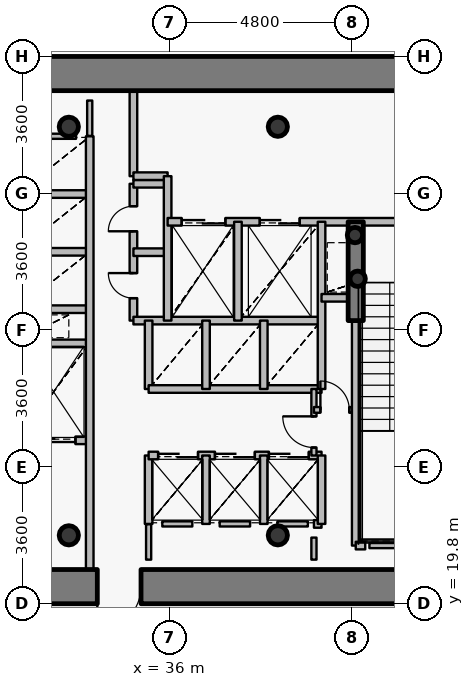
"""IFC4 building model, lengths in metres.
Left out: names, types, materials, properties, quantities, classifications, styles, units other than length and angle.
Written with IfcOpenShell. Run it as: python <this file> out.ifc"""

import sys

from ifc_helpers import new_model, si_unit, direction, frame, frame_2d, origin, origin_2d, place, context, subcontext, project, spatial, rectangle, hollow_circle, extrude, source, transform, mapped, element, fill, save


model = new_model("IFC4")
c1 = context("Model", 3, precision=1e-05, world=origin(), true_north=direction((0.0, 1.0)))
c2 = subcontext(c1, "Body", "Model", "MODEL_VIEW")
j1 = project(units=[si_unit("LENGTHUNIT", "METRE"), si_unit("PLANEANGLEUNIT", "RADIAN")], contexts=[c1])
p1 = place(None, origin())
s1 = spatial("IfcSite", under=j1, at=p1, CompositionType="ELEMENT")
p2 = place(p1, origin())
s2 = spatial("IfcBuilding", under=s1, at=p2, CompositionType="ELEMENT")
p3 = place(p2, frame((0.0, 0.0, 78.6)))
s3 = spatial("IfcBuildingStorey", under=s2, at=p3, CompositionType="ELEMENT", Elevation=78.6)
for number, where, z_axis, x_axis in (
    (1, (33.35, 21.6, 0.0), (0.0, 0.0, 1.0), (1.0, 0.0, 0.0)),
    (2, (38.85, 21.6, 0.0), (0.0, 0.0, 1.0), (1.0, 0.0, 0.0)),
    (3, (38.85, 32.35, 0.0), (0.0, 0.0, 1.0), (1.0, 0.0, 0.0)),
    (4, (33.35, 32.35, 0.0), (0.0, 0.0, 1.0), (1.0, 0.0, 0.0)),
):
    element("IfcColumn", number, at=place(p3, frame(where, z_axis=z_axis, x_axis=x_axis)), inside=s3, PredefinedType="COLUMN", context=c2, shape_type="SweptSolid", body=[
        extrude(hollow_circle(Radius=0.254, WallThickness=0.02, at=origin_2d()), origin(), (0.0, 0.0, 1.0), 4.2),
    ])
for number, where, z_axis, x_axis in (
    (5, (40.95, 28.35, 0.0), (0.0, 0.0, 1.0), (1.0, 0.0, 0.0)),
    (6, (40.88, 29.5, 0.0), (0.0, 0.0, 1.0), (1.0, 0.0, 0.0)),
):
    element("IfcColumn", number, at=place(p3, frame(where, z_axis=z_axis, x_axis=x_axis)), inside=s3, PredefinedType="COLUMN", context=c2, shape_type="SweptSolid", body=[
        extrude(hollow_circle(Radius=0.203, WallThickness=0.016, at=origin_2d()), origin(), (0.0, 0.0, 1.0), 4.2),
    ])
p4 = place(p3, frame((26.75, 33.75, 0.0), z_axis=(0.0, 0.0, 1.0), x_axis=(1.0, 0.0, 0.0)))
e7 = element("IfcWall", 7, at=p4, inside=s3, PredefinedType="SHEAR", context=c2, shape_type="SweptSolid", body=[
    extrude(rectangle(XDim=18.5, YDim=0.9, at=frame_2d((9.25, 0.0))), origin(), (0.0, 0.0, 1.0), 3.4),
])
p5 = place(p3, frame((45.25, 20.25, 0.0), z_axis=(0.0, 0.0, 1.0), x_axis=(-1.0, 0.0, 0.0)))
e8 = element("IfcWall", 8, at=p5, inside=s3, PredefinedType="SHEAR", context=c2, shape_type="SweptSolid", body=[
    extrude(rectangle(XDim=18.5, YDim=0.9, at=frame_2d((9.25, 0.0))), origin(), (0.0, 0.0, 1.0), 3.4),
])
p6 = place(p5, frame((10.0, 0.0, 0.0)))
e9 = element("IfcOpeningElement", 9, at=p6, cuts=e8, PredefinedType="OPENING", context=c2, shape_type="SweptSolid", body=[
    extrude(rectangle(XDim=1.15, YDim=2.15, at=origin_2d()), frame((0.575, 0.46, 1.075), z_axis=(0.0, -1.0, 0.0), x_axis=(1.0, 0.0, 0.0)), (0.0, 0.0, 1.0), 0.92),
])
p7 = place(p3, frame((40.9, 27.25, 0.0), z_axis=(0.0, 0.0, 1.0), x_axis=(0.0, 1.0, 0.0)))
e10 = element("IfcWall", 10, at=p7, inside=s3, PredefinedType="SHEAR", context=c2, shape_type="SweptSolid", body=[
    extrude(rectangle(XDim=2.6, YDim=0.4, at=frame_2d((1.3, 0.0))), origin(), (0.0, 0.0, 1.0), 3.55),
])
p8 = place(p3, frame((32.0, 24.1, 0.0), z_axis=(0.0, 0.0, 1.0), x_axis=(1.0, 0.0, 0.0)))
e11 = element("IfcWall", 11, at=p8, inside=s3, PredefinedType="PARTITIONING", context=c2, shape_type="SweptSolid", body=[
    extrude(rectangle(XDim=1.9, YDim=0.2, at=frame_2d((0.95, 0.0))), origin(), (0.0, 0.0, 1.0), 3.535),
])
p9 = place(p8, frame((0.375, 0.0, 0.0)))
e12 = element("IfcOpeningElement", 12, at=p9, cuts=e11, PredefinedType="OPENING", context=c2, shape_type="SweptSolid", body=[
    extrude(rectangle(XDim=1.15, YDim=2.15, at=origin_2d()), frame((0.575, 0.11, 1.075), z_axis=(0.0, -1.0, 0.0), x_axis=(1.0, 0.0, 0.0)), (0.0, 0.0, 1.0), 0.22),
])
for number, where, z_axis, x_axis in (
    (13, (32.0, 26.65, 0.0), (0.0, 0.0, 1.0), (1.0, 0.0, 0.0)),
    (14, (32.0, 27.55, 0.0), (0.0, 0.0, 1.0), (1.0, 0.0, 0.0)),
    (15, (32.0, 29.06, 0.0), (0.0, 0.0, 1.0), (1.0, 0.0, 0.0)),
    (16, (32.0, 30.58, 0.0), (0.0, 0.0, 1.0), (1.0, 0.0, 0.0)),
):
    element("IfcWall", number, at=place(p3, frame(where, z_axis=z_axis, x_axis=x_axis)), inside=s3, PredefinedType="PARTITIONING", context=c2, shape_type="SweptSolid", body=[
        extrude(rectangle(XDim=1.9, YDim=0.2, at=frame_2d((0.95, 0.0))), origin(), (0.0, 0.0, 1.0), 3.535),
    ])
p10 = place(p3, frame((33.9, 20.7, 0.0), z_axis=(0.0, 0.0, 1.0), x_axis=(0.0, 1.0, 0.0)))
e17 = element("IfcWall", 17, at=p10, inside=s3, PredefinedType="PARTITIONING", context=c2, shape_type="SweptSolid", body=[
    extrude(rectangle(XDim=11.4, YDim=0.2, at=frame_2d((5.7, 0.0))), origin(), (0.0, 0.0, 1.0), 3.535),
])
p11 = place(p3, frame((35.05, 27.25, 0.0), z_axis=(0.0, 0.0, 1.0), x_axis=(0.0, 1.0, 0.0)))
e18 = element("IfcWall", 18, at=p11, inside=s3, PredefinedType="PARTITIONING", context=c2, shape_type="SweptSolid", body=[
    extrude(rectangle(XDim=3.6, YDim=0.2, at=frame_2d((1.8, 0.0))), origin(), (0.0, 0.0, 1.0), 3.95),
])
p12 = place(p11, frame((0.59, 0.0, 0.0)))
e19 = element("IfcOpeningElement", 19, at=p12, cuts=e18, PredefinedType="OPENING", context=c2, shape_type="SweptSolid", body=[
    extrude(rectangle(XDim=0.66, YDim=2.05, at=origin_2d()), frame((0.33, 0.11, 1.025), z_axis=(0.0, -1.0, 0.0), x_axis=(1.0, 0.0, 0.0)), (0.0, 0.0, 1.0), 0.22),
])
p13 = place(p11, frame((2.35, 0.0, 0.0)))
e20 = element("IfcOpeningElement", 20, at=p13, cuts=e18, PredefinedType="OPENING", context=c2, shape_type="SweptSolid", body=[
    extrude(rectangle(XDim=0.66, YDim=2.05, at=origin_2d()), frame((0.33, 0.11, 1.025), z_axis=(0.0, -1.0, 0.0), x_axis=(1.0, 0.0, 0.0)), (0.0, 0.0, 1.0), 0.22),
])
p14 = place(p3, frame((35.05, 27.25, 0.0), z_axis=(0.0, 0.0, 1.0), x_axis=(1.0, 0.0, 0.0)))
e21 = element("IfcWall", 21, at=p14, inside=s3, PredefinedType="PARTITIONING", context=c2, shape_type="SweptSolid", body=[
    extrude(rectangle(XDim=4.95, YDim=0.2, at=frame_2d((2.475, 0.0))), origin(), (0.0, 0.0, 1.0), 3.535),
])
for number, where, z_axis, x_axis in (
    (22, (35.05, 29.05, 0.0), (0.0, 0.0, 1.0), (1.0, 0.0, 0.0)),
    (23, (35.05, 30.85, 0.0), (0.0, 0.0, 1.0), (1.0, 0.0, 0.0)),
):
    element("IfcWall", number, at=place(p3, frame(where, z_axis=z_axis, x_axis=x_axis)), inside=s3, PredefinedType="PARTITIONING", context=c2, shape_type="SweptSolid", body=[
        extrude(rectangle(XDim=0.9, YDim=0.2, at=frame_2d((0.45, 0.0))), origin(), (0.0, 0.0, 1.0), 3.95),
    ])
p15 = place(p3, frame((35.05, 31.05, 0.0), z_axis=(0.0, 0.0, 1.0), x_axis=(0.0, 1.0, 0.0)))
e24 = element("IfcWall", 24, at=p15, inside=s3, PredefinedType="PARTITIONING", context=c2, shape_type="SweptSolid", body=[
    extrude(rectangle(XDim=2.25, YDim=0.2, at=frame_2d((1.125, 0.0))), origin(), (0.0, 0.0, 1.0), 3.535),
])
p16 = place(p3, frame((35.05, 31.05, 0.0), z_axis=(0.0, 0.0, 1.0), x_axis=(1.0, 0.0, 0.0)))
e25 = element("IfcWall", 25, at=p16, inside=s3, PredefinedType="PARTITIONING", context=c2, shape_type="SweptSolid", body=[
    extrude(rectangle(XDim=0.9, YDim=0.2, at=frame_2d((0.45, 0.0))), origin(), (0.0, 0.0, 1.0), 3.95),
])
p17 = place(p3, frame((35.45, 21.9, 0.0), z_axis=(0.0, 0.0, 1.0), x_axis=(0.0, 1.0, 0.0)))
e26 = element("IfcWall", 26, at=p17, inside=s3, PredefinedType="PARTITIONING", context=c2, shape_type="SweptSolid", body=[
    extrude(rectangle(XDim=1.8, YDim=0.2, at=frame_2d((0.9, 0.0))), origin(), (0.0, 0.0, 1.0), 3.95),
])
p18 = place(p3, frame((35.45, 23.7, 0.0), z_axis=(0.0, 0.0, 1.0), x_axis=(1.0, 0.0, 0.0)))
e27 = element("IfcWall", 27, at=p18, inside=s3, PredefinedType="PARTITIONING", context=c2, shape_type="SweptSolid", body=[
    extrude(rectangle(XDim=4.55, YDim=0.2, at=frame_2d((2.275, 0.0))), origin(), (0.0, 0.0, 1.0), 3.535),
])
p19 = place(p18, frame((0.25, 0.0, 0.0)))
e28 = element("IfcOpeningElement", 28, at=p19, cuts=e27, PredefinedType="OPENING", context=c2, shape_type="SweptSolid", body=[
    extrude(rectangle(XDim=1.05, YDim=2.15, at=origin_2d()), frame((0.525, 0.11, 1.075), z_axis=(0.0, -1.0, 0.0), x_axis=(1.0, 0.0, 0.0)), (0.0, 0.0, 1.0), 0.22),
])
p20 = place(p18, frame((1.745, 0.0, 0.0)))
e29 = element("IfcOpeningElement", 29, at=p20, cuts=e27, PredefinedType="OPENING", context=c2, shape_type="SweptSolid", body=[
    extrude(rectangle(XDim=1.05, YDim=2.15, at=origin_2d()), frame((0.525, 0.11, 1.075), z_axis=(0.0, -1.0, 0.0), x_axis=(1.0, 0.0, 0.0)), (0.0, 0.0, 1.0), 0.22),
])
p21 = place(p18, frame((3.165, 0.0, 0.0)))
e30 = element("IfcOpeningElement", 30, at=p21, cuts=e27, PredefinedType="OPENING", context=c2, shape_type="SweptSolid", body=[
    extrude(rectangle(XDim=1.05, YDim=2.15, at=origin_2d()), frame((0.525, 0.11, 1.075), z_axis=(0.0, -1.0, 0.0), x_axis=(1.0, 0.0, 0.0)), (0.0, 0.0, 1.0), 0.22),
])
p22 = place(p3, frame((35.45, 25.45, 0.0), z_axis=(0.0, 0.0, 1.0), x_axis=(0.0, 1.0, 0.0)))
e31 = element("IfcWall", 31, at=p22, inside=s3, PredefinedType="PARTITIONING", context=c2, shape_type="SweptSolid", body=[
    extrude(rectangle(XDim=1.8, YDim=0.2, at=frame_2d((0.9, 0.0))), origin(), (0.0, 0.0, 1.0), 3.95),
])
p23 = place(p3, frame((35.45, 25.45, 0.0), z_axis=(0.0, 0.0, 1.0), x_axis=(1.0, 0.0, 0.0)))
e32 = element("IfcWall", 32, at=p23, inside=s3, PredefinedType="PARTITIONING", context=c2, shape_type="SweptSolid", body=[
    extrude(rectangle(XDim=4.55, YDim=0.2, at=frame_2d((2.275, 0.0))), origin(), (0.0, 0.0, 1.0), 3.535),
])
p24 = place(p3, frame((35.95, 27.25, 0.0), z_axis=(0.0, 0.0, 1.0), x_axis=(0.0, 1.0, 0.0)))
e33 = element("IfcWall", 33, at=p24, inside=s3, PredefinedType="PARTITIONING", context=c2, shape_type="SweptSolid", body=[
    extrude(rectangle(XDim=3.8, YDim=0.2, at=frame_2d((1.9, 0.0))), origin(), (0.0, 0.0, 1.0), 3.95),
])
p25 = place(p3, frame((35.95, 29.85, 0.0), z_axis=(0.0, 0.0, 1.0), x_axis=(1.0, 0.0, 0.0)))
e34 = element("IfcWall", 34, at=p25, inside=s3, PredefinedType="PARTITIONING", context=c2, shape_type="SweptSolid", body=[
    extrude(rectangle(XDim=8.49, YDim=0.2, at=frame_2d((4.245, 0.0))), origin(), (0.0, 0.0, 1.0), 3.535),
])
p26 = place(p25, frame((6.1, 0.0, 0.0)))
e35 = element("IfcOpeningElement", 35, at=p26, cuts=e34, PredefinedType="OPENING", context=c2, shape_type="SweptSolid", body=[
    extrude(rectangle(XDim=1.2, YDim=2.15, at=origin_2d()), frame((0.6, 0.11, 1.075), z_axis=(0.0, -1.0, 0.0), x_axis=(1.0, 0.0, 0.0)), (0.0, 0.0, 1.0), 0.22),
])
p27 = place(p25, frame((0.37, 0.0, 0.0)))
e36 = element("IfcOpeningElement", 36, at=p27, cuts=e34, PredefinedType="OPENING", context=c2, shape_type="SweptSolid", body=[
    extrude(rectangle(XDim=1.15, YDim=2.15, at=origin_2d()), frame((0.575, 0.11, 1.075), z_axis=(0.0, -1.0, 0.0), x_axis=(1.0, 0.0, 0.0)), (0.0, 0.0, 1.0), 0.22),
])
p28 = place(p25, frame((2.425, 0.0, 0.0)))
e37 = element("IfcOpeningElement", 37, at=p28, cuts=e34, PredefinedType="OPENING", context=c2, shape_type="SweptSolid", body=[
    extrude(rectangle(XDim=1.05, YDim=2.15, at=origin_2d()), frame((0.525, 0.11, 1.075), z_axis=(0.0, -1.0, 0.0), x_axis=(1.0, 0.0, 0.0)), (0.0, 0.0, 1.0), 0.22),
])
for number, where, z_axis, x_axis in (
    (38, (36.96, 21.9, 0.0), (0.0, 0.0, 1.0), (0.0, 1.0, 0.0)),
    (39, (36.96, 25.45, 0.0), (0.0, 0.0, 1.0), (0.0, 1.0, 0.0)),
):
    element("IfcWall", number, at=place(p3, frame(where, z_axis=z_axis, x_axis=x_axis)), inside=s3, PredefinedType="PARTITIONING", context=c2, shape_type="SweptSolid", body=[
        extrude(rectangle(XDim=1.8, YDim=0.2, at=frame_2d((0.9, 0.0))), origin(), (0.0, 0.0, 1.0), 3.95),
    ])
p29 = place(p3, frame((37.8, 27.25, 0.0), z_axis=(0.0, 0.0, 1.0), x_axis=(0.0, 1.0, 0.0)))
e40 = element("IfcWall", 40, at=p29, inside=s3, PredefinedType="PARTITIONING", context=c2, shape_type="SweptSolid", body=[
    extrude(rectangle(XDim=2.6, YDim=0.2, at=frame_2d((1.3, 0.0))), origin(), (0.0, 0.0, 1.0), 3.95),
])
for number, where, z_axis, x_axis in (
    (41, (38.48, 21.9, 0.0), (0.0, 0.0, 1.0), (0.0, 1.0, 0.0)),
    (42, (38.48, 25.45, 0.0), (0.0, 0.0, 1.0), (0.0, 1.0, 0.0)),
):
    element("IfcWall", number, at=place(p3, frame(where, z_axis=z_axis, x_axis=x_axis)), inside=s3, PredefinedType="PARTITIONING", context=c2, shape_type="SweptSolid", body=[
        extrude(rectangle(XDim=1.8, YDim=0.2, at=frame_2d((0.9, 0.0))), origin(), (0.0, 0.0, 1.0), 3.95),
    ])
p30 = place(p3, frame((39.8, 21.9, 0.0), z_axis=(0.0, 0.0, 1.0), x_axis=(1.0, 0.0, 0.0)))
e43 = element("IfcWall", 43, at=p30, inside=s3, PredefinedType="PARTITIONING", context=c2, shape_type="SweptSolid", body=[
    extrude(rectangle(XDim=0.2, YDim=0.2, at=frame_2d((0.1, 0.0))), origin(), (0.0, 0.0, 1.0), 3.95),
])
p31 = place(p3, frame((39.8, 23.7, 0.0), z_axis=(0.0, 0.0, 1.0), x_axis=(0.0, 1.0, 0.0)))
e44 = element("IfcWall", 44, at=p31, inside=s3, PredefinedType="PARTITIONING", context=c2, shape_type="SweptSolid", body=[
    extrude(rectangle(XDim=1.75, YDim=0.135, at=frame_2d((0.875, 0.0))), origin(), (0.0, 0.0, 1.0), 3.95),
])
p32 = place(p31, frame((0.21, 0.0, 0.0)))
e45 = element("IfcOpeningElement", 45, at=p32, cuts=e44, PredefinedType="OPENING", context=c2, shape_type="SweptSolid", body=[
    extrude(rectangle(XDim=0.82, YDim=2.1, at=origin_2d()), frame((0.41, 0.078, 1.05), z_axis=(0.0, -1.0, 0.0), x_axis=(1.0, 0.0, 0.0)), (0.0, 0.0, 1.0), 0.155),
])
p33 = place(p3, frame((39.8, 24.9, 0.0), z_axis=(0.0, 0.0, 1.0), x_axis=(1.0, 0.0, 0.0)))
e46 = element("IfcWall", 46, at=p33, inside=s3, PredefinedType="PARTITIONING", context=c2, shape_type="SweptSolid", body=[
    extrude(rectangle(XDim=1.1, YDim=0.15, at=frame_2d((0.55, 0.0))), origin(), (0.0, 0.0, 1.0), 3.95),
])
p34 = place(p33, frame((0.17, 0.0, 0.0)))
e47 = element("IfcOpeningElement", 47, at=p34, cuts=e46, PredefinedType="OPENING", context=c2, shape_type="SweptSolid", body=[
    extrude(rectangle(XDim=0.76, YDim=2.1, at=origin_2d()), frame((0.38, 0.085, 1.05), z_axis=(0.0, -1.0, 0.0), x_axis=(1.0, 0.0, 0.0)), (0.0, 0.0, 1.0), 0.17),
])
p35 = place(p3, frame((40.0, 21.9, 0.0), z_axis=(0.0, 0.0, 1.0), x_axis=(0.0, 1.0, 0.0)))
e48 = element("IfcWall", 48, at=p35, inside=s3, PredefinedType="PARTITIONING", context=c2, shape_type="SweptSolid", body=[
    extrude(rectangle(XDim=1.8, YDim=0.2, at=frame_2d((0.9, 0.0))), origin(), (0.0, 0.0, 1.0), 3.95),
])
p36 = place(p3, frame((40.0, 25.45, 0.0), z_axis=(0.0, 0.0, 1.0), x_axis=(0.0, 1.0, 0.0)))
e49 = element("IfcWall", 49, at=p36, inside=s3, PredefinedType="PARTITIONING", context=c2, shape_type="SweptSolid", body=[
    extrude(rectangle(XDim=4.4, YDim=0.2, at=frame_2d((2.2, 0.0))), origin(), (0.0, 0.0, 1.0), 3.95),
])
p37 = place(p3, frame((40.0, 27.85, 0.0), z_axis=(0.0, 0.0, 1.0), x_axis=(1.0, 0.0, 0.0)))
e50 = element("IfcWall", 50, at=p37, inside=s3, PredefinedType="PARTITIONING", context=c2, shape_type="SweptSolid", body=[
    extrude(rectangle(XDim=0.9, YDim=0.2, at=frame_2d((0.45, 0.0))), origin(), (0.0, 0.0, 1.0), 3.95),
])
p38 = place(p3, frame((40.9, 21.33, 0.0), z_axis=(0.0, 0.0, 1.0), x_axis=(0.0, 1.0, 0.0)))
e51 = element("IfcWall", 51, at=p38, inside=s3, PredefinedType="PARTITIONING", context=c2, shape_type="SweptSolid", body=[
    extrude(rectangle(XDim=5.91, YDim=0.2, at=frame_2d((2.955, 0.0))), origin(), (0.0, 0.0, 1.0), 3.485),
])
p39 = place(p3, frame((40.9, 21.33, 0.0), z_axis=(0.0, 0.0, 1.0), x_axis=(1.0, 0.0, 0.0)))
e52 = element("IfcWall", 52, at=p39, inside=s3, PredefinedType="PARTITIONING", context=c2, shape_type="SweptSolid", body=[
    extrude(rectangle(XDim=0.25, YDim=0.2, at=frame_2d((0.125, 0.0))), origin(), (0.0, 0.0, 1.0), 3.485),
])
p40 = place(p3, frame((44.08, 21.33, 0.0), z_axis=(0.0, 0.0, 1.0), x_axis=(-1.0, 0.0, 0.0)))
e53 = element("IfcWall", 53, at=p40, inside=s3, PredefinedType="PARTITIONING", context=c2, shape_type="SweptSolid", body=[
    extrude(rectangle(XDim=2.82, YDim=0.135, at=frame_2d((1.41, 0.0))), origin(), (0.0, 0.0, 1.0), 3.485),
])
p41 = place(p3, frame((36.6, 21.9, 0.0), z_axis=(0.0, 0.0, 1.0), x_axis=(-1.0, 0.0, 0.0)))
e54 = element("IfcWall", 54, at=p41, inside=s3, PredefinedType="PARTITIONING", context=c2, shape_type="SweptSolid", body=[
    extrude(rectangle(XDim=0.79, YDim=0.135, at=frame_2d((0.395, 0.0))), origin(), (0.0, 0.0, 1.0), 3.95),
])
p42 = place(p3, frame((38.12, 21.9, 0.0), z_axis=(0.0, 0.0, 1.0), x_axis=(-1.0, 0.0, 0.0)))
e55 = element("IfcWall", 55, at=p42, inside=s3, PredefinedType="PARTITIONING", context=c2, shape_type="SweptSolid", body=[
    extrude(rectangle(XDim=0.8, YDim=0.135, at=frame_2d((0.4, 0.0))), origin(), (0.0, 0.0, 1.0), 3.95),
])
p43 = place(p3, frame((39.64, 21.9, 0.0), z_axis=(0.0, 0.0, 1.0), x_axis=(-1.0, 0.0, 0.0)))
e56 = element("IfcWall", 56, at=p43, inside=s3, PredefinedType="PARTITIONING", context=c2, shape_type="SweptSolid", body=[
    extrude(rectangle(XDim=0.8, YDim=0.135, at=frame_2d((0.4, 0.0))), origin(), (0.0, 0.0, 1.0), 3.535),
])
p44 = place(p3, frame((32.36, 32.1, 0.0), z_axis=(0.0, 0.0, 1.0), x_axis=(1.0, 0.0, 0.0)))
e57 = element("IfcWall", 57, at=p44, inside=s3, PredefinedType="PARTITIONING", context=c2, shape_type="SweptSolid", body=[
    extrude(rectangle(XDim=1.18, YDim=0.135, at=frame_2d((0.59, 0.0))), origin(), (0.0, 0.0, 1.0), 3.535),
])
p45 = place(p3, frame((39.8, 20.96, 0.0), z_axis=(0.0, 0.0, 1.0), x_axis=(0.0, 1.0, 0.0)))
e58 = element("IfcWall", 58, at=p45, inside=s3, PredefinedType="PARTITIONING", context=c2, shape_type="SweptSolid", body=[
    extrude(rectangle(XDim=0.58, YDim=0.135, at=frame_2d((0.29, 0.0))), origin(), (0.0, 0.0, 1.0), 3.485),
])
for number, where, z_axis, x_axis in (
    (59, (35.45, 21.89, 0.0), (0.0, 0.0, 1.0), (0.0, -1.0, 0.0)),
    (60, (33.9, 32.11, 0.0), (0.0, 0.0, 1.0), (0.0, 1.0, 0.0)),
):
    element("IfcWall", number, at=place(p3, frame(where, z_axis=z_axis, x_axis=x_axis)), inside=s3, PredefinedType="PARTITIONING", context=c2, shape_type="SweptSolid", body=[
        extrude(rectangle(XDim=0.93, YDim=0.135, at=frame_2d((0.465, 0.0))), origin(), (0.0, 0.0, 1.0), 3.535),
    ])
m1 = source(origin(), c2, "Body", "SweptSolid", [
    extrude(rectangle(XDim=1.15, YDim=2.15, at=origin_2d()), frame((0.575, 0.025, 1.075), z_axis=(0.0, -1.0, 0.0), x_axis=(1.0, 0.0, 0.0)), (0.0, 0.0, 1.0), 0.05),
])
p46 = place(p6, origin())
e61 = element("IfcDoor", 61, at=p46, inside=s3, OperationType="SINGLE_SWING_RIGHT", PredefinedType="DOOR", context=c2, shape_type="MappedRepresentation", body=[
    mapped(m1, transform((0.0, 0.0, 0.0), x_axis=(1.0, 0.0, 0.0), y_axis=(0.0, 1.0, 0.0), z_axis=(0.0, 0.0, 1.0), scale=1.0)),
])
fill(e9, e61)
m2 = source(origin(), c2, "Body", "SweptSolid", [
    extrude(rectangle(XDim=1.15, YDim=2.15, at=origin_2d()), frame((0.575, 0.025, 1.075), z_axis=(0.0, -1.0, 0.0), x_axis=(1.0, 0.0, 0.0)), (0.0, 0.0, 1.0), 0.05),
])
p47 = place(p27, origin())
e62 = element("IfcDoor", 62, at=p47, inside=s3, OperationType="DOUBLE_DOOR_SLIDING", PredefinedType="USERDEFINED", context=c2, shape_type="MappedRepresentation", body=[
    mapped(m2, transform((0.0, 0.0, 0.0), x_axis=(1.0, 0.0, 0.0), y_axis=(0.0, 1.0, 0.0), z_axis=(0.0, 0.0, 1.0), scale=1.0)),
])
fill(e36, e62)
p48 = place(p9, origin())
e63 = element("IfcDoor", 63, at=p48, inside=s3, OperationType="DOUBLE_DOOR_SLIDING", PredefinedType="USERDEFINED", context=c2, shape_type="MappedRepresentation", body=[
    mapped(m2, transform((0.0, 0.0, 0.0), x_axis=(1.0, 0.0, 0.0), y_axis=(0.0, 1.0, 0.0), z_axis=(0.0, 0.0, 1.0), scale=1.0)),
])
fill(e12, e63)
m3 = source(origin(), c2, "Body", "SweptSolid", [
    extrude(rectangle(XDim=1.05, YDim=2.15, at=origin_2d()), frame((0.525, 0.025, 1.075), z_axis=(0.0, -1.0, 0.0), x_axis=(1.0, 0.0, 0.0)), (0.0, 0.0, 1.0), 0.05),
])
p49 = place(p28, origin())
e64 = element("IfcDoor", 64, at=p49, inside=s3, OperationType="DOUBLE_DOOR_SLIDING", PredefinedType="USERDEFINED", context=c2, shape_type="MappedRepresentation", body=[
    mapped(m3, transform((0.0, 0.0, 0.0), x_axis=(1.0, 0.0, 0.0), y_axis=(0.0, 1.0, 0.0), z_axis=(0.0, 0.0, 1.0), scale=1.0)),
])
fill(e37, e64)
p50 = place(p19, origin())
e65 = element("IfcDoor", 65, at=p50, inside=s3, OperationType="DOUBLE_DOOR_SLIDING", PredefinedType="USERDEFINED", context=c2, shape_type="MappedRepresentation", body=[
    mapped(m3, transform((0.0, 0.0, 0.0), x_axis=(1.0, 0.0, 0.0), y_axis=(0.0, 1.0, 0.0), z_axis=(0.0, 0.0, 1.0), scale=1.0)),
])
fill(e28, e65)
p51 = place(p20, origin())
e66 = element("IfcDoor", 66, at=p51, inside=s3, OperationType="DOUBLE_DOOR_SLIDING", PredefinedType="USERDEFINED", context=c2, shape_type="MappedRepresentation", body=[
    mapped(m3, transform((0.0, 0.0, 0.0), x_axis=(1.0, 0.0, 0.0), y_axis=(0.0, 1.0, 0.0), z_axis=(0.0, 0.0, 1.0), scale=1.0)),
])
fill(e29, e66)
p52 = place(p21, origin())
e67 = element("IfcDoor", 67, at=p52, inside=s3, OperationType="DOUBLE_DOOR_SLIDING", PredefinedType="USERDEFINED", context=c2, shape_type="MappedRepresentation", body=[
    mapped(m3, transform((0.0, 0.0, 0.0), x_axis=(1.0, 0.0, 0.0), y_axis=(0.0, 1.0, 0.0), z_axis=(0.0, 0.0, 1.0), scale=1.0)),
])
fill(e30, e67)
m4 = source(origin(), c2, "Body", "SweptSolid", [
    extrude(rectangle(XDim=0.66, YDim=2.05, at=origin_2d()), frame((0.33, 0.025, 1.025), z_axis=(0.0, -1.0, 0.0), x_axis=(1.0, 0.0, 0.0)), (0.0, 0.0, 1.0), 0.05),
])
p53 = place(p12, origin())
e68 = element("IfcDoor", 68, at=p53, inside=s3, OperationType="SINGLE_SWING_RIGHT", PredefinedType="USERDEFINED", context=c2, shape_type="MappedRepresentation", body=[
    mapped(m4, transform((0.0, 0.0, 0.0), x_axis=(1.0, 0.0, 0.0), y_axis=(0.0, 1.0, 0.0), z_axis=(0.0, 0.0, 1.0), scale=1.0)),
])
fill(e19, e68)
p54 = place(p13, origin())
e69 = element("IfcDoor", 69, at=p54, inside=s3, OperationType="SINGLE_SWING_LEFT", PredefinedType="USERDEFINED", context=c2, shape_type="MappedRepresentation", body=[
    mapped(m4, transform((0.0, 0.0, 0.0), x_axis=(1.0, 0.0, 0.0), y_axis=(0.0, 1.0, 0.0), z_axis=(0.0, 0.0, 1.0), scale=1.0)),
])
fill(e20, e69)
m5 = source(origin(), c2, "Body", "SweptSolid", [
    extrude(rectangle(XDim=0.82, YDim=2.1, at=origin_2d()), frame((0.41, 0.025, 1.05), z_axis=(0.0, -1.0, 0.0), x_axis=(1.0, 0.0, 0.0)), (0.0, 0.0, 1.0), 0.05),
])
p55 = place(p32, origin())
e70 = element("IfcDoor", 70, at=p55, inside=s3, OperationType="SINGLE_SWING_RIGHT", PredefinedType="DOOR", context=c2, shape_type="MappedRepresentation", body=[
    mapped(m5, transform((0.0, 0.0, 0.0), x_axis=(1.0, 0.0, 0.0), y_axis=(0.0, 1.0, 0.0), z_axis=(0.0, 0.0, 1.0), scale=1.0)),
])
fill(e45, e70)
m6 = source(origin(), c2, "Body", "SweptSolid", [
    extrude(rectangle(XDim=0.76, YDim=2.1, at=origin_2d()), frame((0.38, 0.025, 1.05), z_axis=(0.0, -1.0, 0.0), x_axis=(1.0, 0.0, 0.0)), (0.0, 0.0, 1.0), 0.05),
])
p56 = place(p34, origin())
e71 = element("IfcDoor", 71, at=p56, inside=s3, OperationType="SINGLE_SWING_LEFT", PredefinedType="DOOR", context=c2, shape_type="MappedRepresentation", body=[
    mapped(m6, transform((0.0, 0.0, 0.0), x_axis=(1.0, 0.0, 0.0), y_axis=(0.0, 1.0, 0.0), z_axis=(0.0, 0.0, 1.0), scale=1.0)),
])
fill(e47, e71)
save(model, sys.argv[1])
